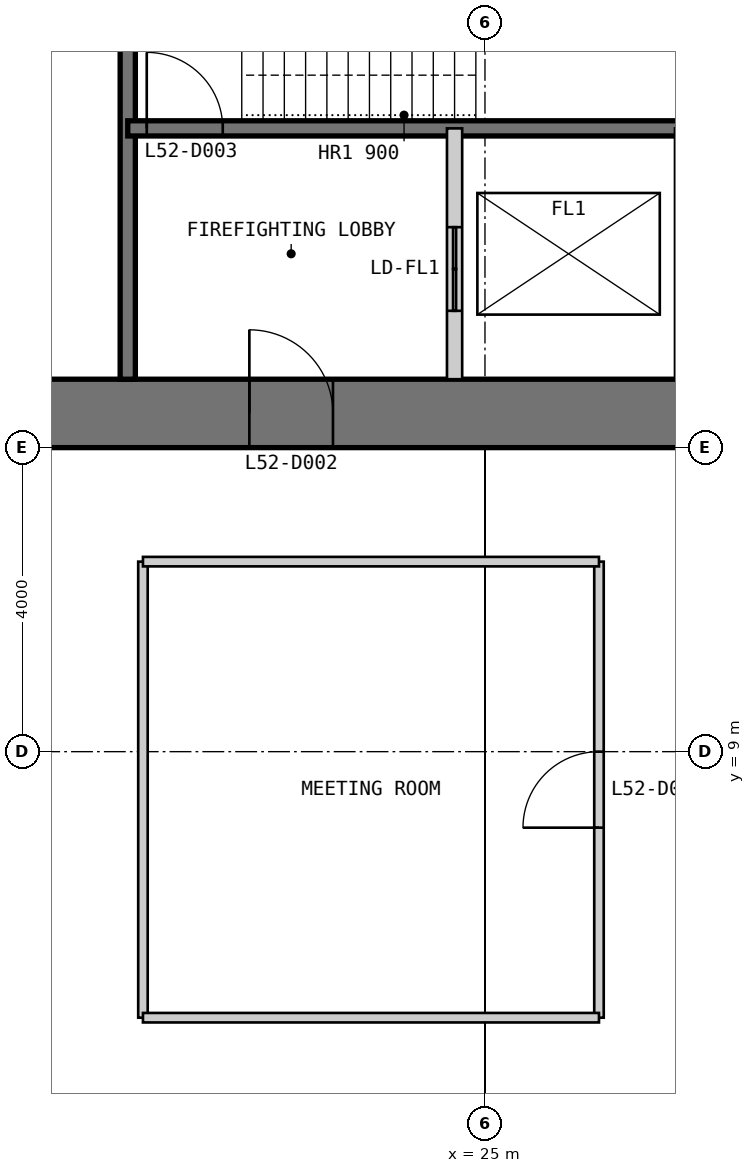
"""IFC4 building model, lengths in metres.
Left out: names, types, materials, properties, quantities, classifications, styles, units other than length and angle.
Written with IfcOpenShell. Run it as: python <this file> out.ifc"""

import sys

from ifc_helpers import new_model, si_unit, direction, frame, frame_2d, origin, place, context, subcontext, project, spatial, polyline, rectangle, outline, extrude, element, fill, save


model = new_model("IFC4")
c1 = context("Model", 3, precision=1e-05, world=origin(), true_north=direction((0.0, 1.0)))
c2 = subcontext(c1, "Body", "Model", "MODEL_VIEW")
j1 = project(units=[si_unit("LENGTHUNIT", "METRE"), si_unit("PLANEANGLEUNIT", "RADIAN")], contexts=[c1])
p1 = place(None, origin())
s1 = spatial("IfcSite", under=j1, at=p1, CompositionType="ELEMENT")
p2 = place(p1, origin())
s2 = spatial("IfcBuilding", under=s1, at=p2, CompositionType="ELEMENT")
p3 = place(p2, frame((0.0, 0.0, 221.8)))
s3 = spatial("IfcBuildingStorey", under=s2, at=p3, CompositionType="ELEMENT", Elevation=221.8)
p4 = place(p3, frame((13.0, 13.45, 0.0), z_axis=(0.0, 0.0, 1.0), x_axis=(1.0, 0.0, 0.0)))
e1 = element("IfcWall", 1, at=p4, inside=s3, PredefinedType="SHEAR", context=c2, shape_type="SweptSolid", body=[
    extrude(outline(polyline([(0.0, -0.45), (24.0, -0.45), (23.1, 0.45), (0.9, 0.45), (0.0, -0.45)])), origin(), (0.0, 0.0, 1.0), 4.0),
])
p5 = place(p4, frame((4.9, 0.0, 0.0)))
e2 = element("IfcOpeningElement", 2, at=p5, cuts=e1, PredefinedType="OPENING", context=c2, shape_type="SweptSolid", body=[
    extrude(rectangle(XDim=1.0, YDim=2.2, at=frame_2d((0.5, 1.1))), frame((0.0, 0.46, 0.0), z_axis=(0.0, -1.0, 0.0), x_axis=(1.0, 0.0, 0.0)), (0.0, 0.0, 1.0), 0.92),
])
p6 = place(p4, frame((8.9, 0.0, 0.0)))
e3 = element("IfcOpeningElement", 3, at=p6, cuts=e1, PredefinedType="OPENING", context=c2, shape_type="SweptSolid", body=[
    extrude(rectangle(XDim=1.1, YDim=2.2, at=frame_2d((0.55, 1.1))), frame((0.0, 0.46, 0.0), z_axis=(0.0, -1.0, 0.0), x_axis=(1.0, 0.0, 0.0)), (0.0, 0.0, 1.0), 0.92),
])
p7 = place(p4, frame((15.05, 0.0, 0.0)))
e4 = element("IfcOpeningElement", 4, at=p7, cuts=e1, PredefinedType="OPENING", context=c2, shape_type="SweptSolid", body=[
    extrude(rectangle(XDim=0.9, YDim=2.2, at=frame_2d((0.45, 1.1))), frame((0.0, 0.46, 0.0), z_axis=(0.0, -1.0, 0.0), x_axis=(1.0, 0.0, 0.0)), (0.0, 0.0, 1.0), 0.92),
])
p8 = place(p4, frame((17.9, 0.0, 0.0)))
e5 = element("IfcOpeningElement", 5, at=p8, cuts=e1, PredefinedType="OPENING", context=c2, shape_type="SweptSolid", body=[
    extrude(rectangle(XDim=1.0, YDim=2.2, at=frame_2d((0.5, 1.1))), frame((0.0, 0.46, 0.0), z_axis=(0.0, -1.0, 0.0), x_axis=(1.0, 0.0, 0.0)), (0.0, 0.0, 1.0), 0.92),
])
p9 = place(p4, frame((21.4, 0.0, 0.0)))
e6 = element("IfcOpeningElement", 6, at=p9, cuts=e1, PredefinedType="OPENING", context=c2, shape_type="SweptSolid", body=[
    extrude(rectangle(XDim=1.0, YDim=2.2, at=frame_2d((0.5, 1.1))), frame((0.0, 0.46, 0.0), z_axis=(0.0, -1.0, 0.0), x_axis=(1.0, 0.0, 0.0)), (0.0, 0.0, 1.0), 0.92),
])
p10 = place(p3, frame((20.3, 13.9, 0.0), z_axis=(0.0, 0.0, 1.0), x_axis=(0.0, 1.0, 0.0)))
e7 = element("IfcWall", 7, at=p10, inside=s3, PredefinedType="SOLIDWALL", context=c2, shape_type="SweptSolid", body=[
    extrude(rectangle(XDim=16.1, YDim=0.2, at=frame_2d((8.05, 0.0))), origin(), (0.0, 0.0, 1.0), 3.8),
])
p11 = place(p10, frame((8.4, 0.0, 0.0)))
e8 = element("IfcOpeningElement", 8, at=p11, cuts=e7, PredefinedType="OPENING", context=c2, shape_type="SweptSolid", body=[
    extrude(rectangle(XDim=0.9, YDim=2.2, at=frame_2d((0.45, 1.1))), frame((0.0, 0.11, 0.0), z_axis=(0.0, -1.0, 0.0), x_axis=(1.0, 0.0, 0.0)), (0.0, 0.0, 1.0), 0.22),
])
p12 = place(p10, frame((13.4, 0.0, 0.0)))
e9 = element("IfcOpeningElement", 9, at=p12, cuts=e7, PredefinedType="OPENING", context=c2, shape_type="SweptSolid", body=[
    extrude(rectangle(XDim=0.9, YDim=2.2, at=frame_2d((0.45, 1.1))), frame((0.0, 0.11, 0.0), z_axis=(0.0, -1.0, 0.0), x_axis=(1.0, 0.0, 0.0)), (0.0, 0.0, 1.0), 0.22),
])
p13 = place(p3, frame((20.3, 17.2, 0.0), z_axis=(0.0, 0.0, 1.0), x_axis=(1.0, 0.0, 0.0)))
e10 = element("IfcWall", 10, at=p13, inside=s3, PredefinedType="SOLIDWALL", context=c2, shape_type="SweptSolid", body=[
    extrude(rectangle(XDim=9.4, YDim=0.2, at=frame_2d((4.7, 0.0))), origin(), (0.0, 0.0, 1.0), 3.8),
])
p14 = place(p13, frame((0.25, 0.0, 0.0)))
e11 = element("IfcOpeningElement", 11, at=p14, cuts=e10, PredefinedType="OPENING", context=c2, shape_type="SweptSolid", body=[
    extrude(rectangle(XDim=1.0, YDim=2.2, at=frame_2d((0.5, 1.1))), frame((0.0, 0.11, 0.0), z_axis=(0.0, -1.0, 0.0), x_axis=(1.0, 0.0, 0.0)), (0.0, 0.0, 1.0), 0.22),
])
p15 = place(p3, frame((24.6, 13.9, 0.0), z_axis=(0.0, 0.0, 1.0), x_axis=(0.0, 1.0, 0.0)))
e12 = element("IfcWall", 12, at=p15, inside=s3, PredefinedType="PARTITIONING", context=c2, shape_type="SweptSolid", body=[
    extrude(rectangle(XDim=3.3, YDim=0.2, at=frame_2d((1.65, 0.0))), origin(), (0.0, 0.0, 1.0), 3.8),
])
p16 = place(p15, frame((0.9, 0.0, 0.0)))
e13 = element("IfcOpeningElement", 13, at=p16, cuts=e12, PredefinedType="OPENING", context=c2, shape_type="SweptSolid", body=[
    extrude(rectangle(XDim=1.1, YDim=2.2, at=frame_2d((0.55, 1.1))), frame((0.0, 0.11, 0.0), z_axis=(0.0, -1.0, 0.0), x_axis=(1.0, 0.0, 0.0)), (0.0, 0.0, 1.0), 0.22),
])
p17 = place(p3, frame((20.5, 5.5, 0.0), z_axis=(0.0, 0.0, 1.0), x_axis=(0.0, 1.0, 0.0)))
e14 = element("IfcWall", 14, at=p17, inside=s3, PredefinedType="PARTITIONING", context=c2, shape_type="SweptSolid", body=[
    extrude(rectangle(XDim=6.0, YDim=0.125, at=frame_2d((3.0, 0.0))), origin(), (0.0, 0.0, 1.0), 3.85),
])
p18 = place(p3, frame((26.5, 5.5, 0.0), z_axis=(0.0, 0.0, 1.0), x_axis=(0.0, 1.0, 0.0)))
e15 = element("IfcWall", 15, at=p18, inside=s3, PredefinedType="PARTITIONING", context=c2, shape_type="SweptSolid", body=[
    extrude(rectangle(XDim=6.0, YDim=0.125, at=frame_2d((3.0, 0.0))), origin(), (0.0, 0.0, 1.0), 3.85),
])
p19 = place(p18, frame((2.5, 0.0, 0.0)))
e16 = element("IfcOpeningElement", 16, at=p19, cuts=e15, PredefinedType="OPENING", context=c2, shape_type="SweptSolid", body=[
    extrude(rectangle(XDim=1.0, YDim=2.2, at=frame_2d((0.5, 1.1))), frame((0.0, 0.073, 0.0), z_axis=(0.0, -1.0, 0.0), x_axis=(1.0, 0.0, 0.0)), (0.0, 0.0, 1.0), 0.145),
])
for number, where, z_axis, x_axis in (
    (17, (20.5, 5.5, 0.0), (0.0, 0.0, 1.0), (1.0, 0.0, 0.0)),
    (18, (20.5, 11.5, 0.0), (0.0, 0.0, 1.0), (1.0, 0.0, 0.0)),
):
    element("IfcWall", number, at=place(p3, frame(where, z_axis=z_axis, x_axis=x_axis)), inside=s3, PredefinedType="PARTITIONING", context=c2, shape_type="SweptSolid", body=[
        extrude(rectangle(XDim=6.0, YDim=0.125, at=frame_2d((3.0, 0.0))), origin(), (0.0, 0.0, 1.0), 3.85),
    ])
p20 = place(p6, origin())
e19 = element("IfcDoor", 19, at=p20, inside=s3, OperationType="SINGLE_SWING_LEFT", PredefinedType="DOOR", context=c2, shape_type="SweptSolid", body=[
    extrude(rectangle(XDim=1.1, YDim=2.2, at=frame_2d((0.55, 1.1))), frame((0.0, 0.025, 0.0), z_axis=(0.0, -1.0, 0.0), x_axis=(1.0, 0.0, 0.0)), (0.0, 0.0, 1.0), 0.05),
    extrude(outline(polyline([(0.0, 0.0), (0.04, 0.0), (0.04, 2.16), (1.06, 2.16), (1.06, 0.0), (1.1, 0.0), (1.1, 2.2), (0.0, 2.2), (0.0, 0.0)])), frame((0.0, 0.3, 0.0), z_axis=(0.0, -1.0, 0.0), x_axis=(1.0, 0.0, 0.0)), (0.0, 0.0, 1.0), 0.6),
])
fill(e3, e19)
p21 = place(p14, origin())
e20 = element("IfcDoor", 20, at=p21, inside=s3, OperationType="SINGLE_SWING_LEFT", PredefinedType="DOOR", context=c2, shape_type="SweptSolid", body=[
    extrude(rectangle(XDim=1.0, YDim=2.2, at=frame_2d((0.5, 1.1))), frame((0.0, 0.025, 0.0), z_axis=(0.0, -1.0, 0.0), x_axis=(1.0, 0.0, 0.0)), (0.0, 0.0, 1.0), 0.05),
])
fill(e11, e20)
p22 = place(p19, origin())
e21 = element("IfcDoor", 21, at=p22, inside=s3, OperationType="SINGLE_SWING_LEFT", PredefinedType="DOOR", context=c2, shape_type="SweptSolid", body=[
    extrude(rectangle(XDim=1.0, YDim=2.2, at=frame_2d((0.5, 1.1))), frame((0.0, 0.025, 0.0), z_axis=(0.0, -1.0, 0.0), x_axis=(1.0, 0.0, 0.0)), (0.0, 0.0, 1.0), 0.05),
])
fill(e16, e21)
p23 = place(p16, origin())
e22 = element("IfcDoor", 22, at=p23, inside=s3, OperationType="DOUBLE_DOOR_SLIDING", PredefinedType="DOOR", context=c2, shape_type="SweptSolid", body=[
    extrude(rectangle(XDim=1.1, YDim=2.2, at=frame_2d((0.55, 1.1))), frame((0.0, 0.025, 0.0), z_axis=(0.0, -1.0, 0.0), x_axis=(1.0, 0.0, 0.0)), (0.0, 0.0, 1.0), 0.05),
])
fill(e13, e22)
save(model, sys.argv[1])
